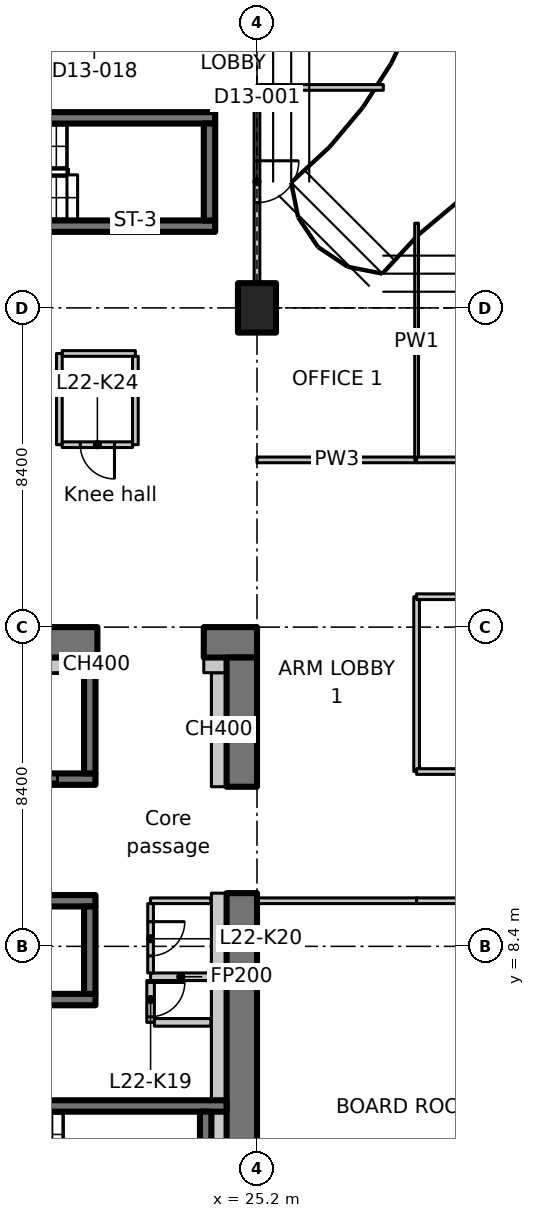
"""IFC4 building model, lengths in metres.
Left out: names, types, materials, properties, quantities, classifications, styles, units other than length and angle.
Written with IfcOpenShell. Run it as: python <this file> out.ifc"""

import sys

from ifc_helpers import new_model, si_unit, direction, frame, frame_2d, origin, origin_2d, place, context, subcontext, project, spatial, polyline, rectangle, outline, extrude, element, fill, save


model = new_model("IFC4")
c1 = context("Model", 3, precision=1e-05, world=origin(), true_north=direction((0.0, 1.0)))
c2 = subcontext(c1, "Body", "Model", "MODEL_VIEW")
j1 = project(units=[si_unit("LENGTHUNIT", "METRE"), si_unit("PLANEANGLEUNIT", "RADIAN")], contexts=[c1])
p1 = place(None, origin())
s1 = spatial("IfcSite", under=j1, at=p1, CompositionType="ELEMENT")
p2 = place(p1, origin())
s2 = spatial("IfcBuilding", under=s1, at=p2, CompositionType="ELEMENT")
p3 = place(p2, frame((0.0, 0.0, 95.3)))
s3 = spatial("IfcBuildingStorey", under=s2, at=p3, CompositionType="ELEMENT", Elevation=95.3)
p4 = place(p3, frame((25.2, 25.2, 0.0), z_axis=(0.0, 0.0, 1.0), x_axis=(1.0, 0.0, 0.0)))
e1 = element("IfcColumn", 1, at=p4, inside=s3, PredefinedType="COLUMN", context=c2, shape_type="SweptSolid", body=[
    extrude(rectangle(XDim=1.0, YDim=1.3, at=origin_2d()), origin(), (0.0, 0.0, 1.0), 3.35),
])
p5 = place(p3, frame((-1.1, 16.4, 0.0), z_axis=(0.0, 0.0, 1.0), x_axis=(1.0, 0.0, 0.0)))
e2 = element("IfcWall", 2, at=p5, inside=s3, PredefinedType="SHEAR", context=c2, shape_type="SweptSolid", body=[
    extrude(rectangle(XDim=22.1, YDim=0.8, at=frame_2d((11.05, 0.0))), origin(), (0.0, 0.0, 1.0), 3.35),
])
p6 = place(p5, frame((3.15, 0.0, 0.0)))
e3 = element("IfcOpeningElement", 3, at=p6, cuts=e2, PredefinedType="OPENING", context=c2, shape_type="SweptSolid", body=[
    extrude(rectangle(XDim=1.1, YDim=2.3, at=frame_2d((0.55, 1.15))), frame((0.0, 0.41, 0.0), z_axis=(0.0, -1.0, 0.0), x_axis=(1.0, 0.0, 0.0)), (0.0, 0.0, 1.0), 0.82),
])
p7 = place(p3, frame((23.8, 16.4, 0.0), z_axis=(0.0, 0.0, 1.0), x_axis=(1.0, 0.0, 0.0)))
e4 = element("IfcWall", 4, at=p7, inside=s3, PredefinedType="SHEAR", context=c2, shape_type="SweptSolid", body=[
    extrude(rectangle(XDim=1.4, YDim=0.8, at=frame_2d((0.7, 0.0))), origin(), (0.0, 0.0, 1.0), 3.35),
])
p8 = place(p3, frame((24.8, 0.8, 0.0), z_axis=(0.0, 0.0, 1.0), x_axis=(0.0, 1.0, 0.0)))
e5 = element("IfcWall", 5, at=p8, inside=s3, PredefinedType="SHEAR", context=c2, shape_type="SweptSolid", body=[
    extrude(rectangle(XDim=9.0, YDim=0.8, at=frame_2d((4.5, 0.0))), origin(), (0.0, 0.0, 1.0), 3.35),
])
p9 = place(p3, frame((24.8, 12.6, 0.0), z_axis=(0.0, 0.0, 1.0), x_axis=(0.0, 1.0, 0.0)))
e6 = element("IfcWall", 6, at=p9, inside=s3, PredefinedType="SHEAR", context=c2, shape_type="SweptSolid", body=[
    extrude(rectangle(XDim=3.4, YDim=0.8, at=frame_2d((1.7, 0.0))), origin(), (0.0, 0.0, 1.0), 3.35),
])
p10 = place(p3, frame((24.2, 12.6, 0.0), z_axis=(0.0, 0.0, 1.0), x_axis=(0.0, 1.0, 0.0)))
e7 = element("IfcWall", 7, at=p10, inside=s3, PredefinedType="PARTITIONING", context=c2, shape_type="SweptSolid", body=[
    extrude(rectangle(XDim=3.0, YDim=0.4, at=frame_2d((1.5, 0.0))), origin(), (0.0, 0.0, 1.0), 3.35),
])
p11 = place(p3, frame((23.8, 15.8, 0.0), z_axis=(0.0, 0.0, 1.0), x_axis=(1.0, 0.0, 0.0)))
e8 = element("IfcWall", 8, at=p11, inside=s3, PredefinedType="PARTITIONING", context=c2, shape_type="SweptSolid", body=[
    extrude(rectangle(XDim=0.6, YDim=0.4, at=frame_2d((0.3, 0.0))), origin(), (0.0, 0.0, 1.0), 3.35),
])
p12 = place(p3, frame((0.8, 7.0, 0.0), z_axis=(0.0, 0.0, 1.0), x_axis=(1.0, 0.0, 0.0)))
e9 = element("IfcWall", 9, at=p12, inside=s3, PredefinedType="SHEAR", context=c2, shape_type="SweptSolid", body=[
    extrude(rectangle(XDim=20.15, YDim=0.3, at=frame_2d((10.075, 0.0))), origin(), (0.0, 0.0, 1.0), 3.35),
])
p13 = place(p3, frame((0.8, 9.6, 0.0), z_axis=(0.0, 0.0, 1.0), x_axis=(1.0, 0.0, 0.0)))
e10 = element("IfcWall", 10, at=p13, inside=s3, PredefinedType="SHEAR", context=c2, shape_type="SweptSolid", body=[
    extrude(rectangle(XDim=20.15, YDim=0.3, at=frame_2d((10.075, 0.0))), origin(), (0.0, 0.0, 1.0), 3.35),
])
p14 = place(p13, frame((1.25, 0.0, 0.0)))
e11 = element("IfcOpeningElement", 11, at=p14, cuts=e10, PredefinedType="OPENING", context=c2, shape_type="SweptSolid", body=[
    extrude(rectangle(XDim=1.1, YDim=2.3, at=frame_2d((0.55, 1.15))), frame((0.0, 0.16, 0.0), z_axis=(0.0, -1.0, 0.0), x_axis=(1.0, 0.0, 0.0)), (0.0, 0.0, 1.0), 0.32),
])
p15 = place(p13, frame((4.05, 0.0, 0.0)))
e12 = element("IfcOpeningElement", 12, at=p15, cuts=e10, PredefinedType="OPENING", context=c2, shape_type="SweptSolid", body=[
    extrude(rectangle(XDim=1.1, YDim=2.3, at=frame_2d((0.55, 1.15))), frame((0.0, 0.16, 0.0), z_axis=(0.0, -1.0, 0.0), x_axis=(1.0, 0.0, 0.0)), (0.0, 0.0, 1.0), 0.32),
])
p16 = place(p13, frame((6.85, 0.0, 0.0)))
e13 = element("IfcOpeningElement", 13, at=p16, cuts=e10, PredefinedType="OPENING", context=c2, shape_type="SweptSolid", body=[
    extrude(rectangle(XDim=1.1, YDim=2.3, at=frame_2d((0.55, 1.15))), frame((0.0, 0.16, 0.0), z_axis=(0.0, -1.0, 0.0), x_axis=(1.0, 0.0, 0.0)), (0.0, 0.0, 1.0), 0.32),
])
p17 = place(p13, frame((9.65, 0.0, 0.0)))
e14 = element("IfcOpeningElement", 14, at=p17, cuts=e10, PredefinedType="OPENING", context=c2, shape_type="SweptSolid", body=[
    extrude(rectangle(XDim=1.1, YDim=2.3, at=frame_2d((0.55, 1.15))), frame((0.0, 0.16, 0.0), z_axis=(0.0, -1.0, 0.0), x_axis=(1.0, 0.0, 0.0)), (0.0, 0.0, 1.0), 0.32),
])
p18 = place(p13, frame((12.45, 0.0, 0.0)))
e15 = element("IfcOpeningElement", 15, at=p18, cuts=e10, PredefinedType="OPENING", context=c2, shape_type="SweptSolid", body=[
    extrude(rectangle(XDim=1.1, YDim=2.3, at=frame_2d((0.55, 1.15))), frame((0.0, 0.16, 0.0), z_axis=(0.0, -1.0, 0.0), x_axis=(1.0, 0.0, 0.0)), (0.0, 0.0, 1.0), 0.32),
])
p19 = place(p13, frame((15.25, 0.0, 0.0)))
e16 = element("IfcOpeningElement", 16, at=p19, cuts=e10, PredefinedType="OPENING", context=c2, shape_type="SweptSolid", body=[
    extrude(rectangle(XDim=1.1, YDim=2.3, at=frame_2d((0.55, 1.15))), frame((0.0, 0.16, 0.0), z_axis=(0.0, -1.0, 0.0), x_axis=(1.0, 0.0, 0.0)), (0.0, 0.0, 1.0), 0.32),
])
p20 = place(p3, frame((20.8, 7.15, 0.0), z_axis=(0.0, 0.0, 1.0), x_axis=(0.0, 1.0, 0.0)))
e17 = element("IfcWall", 17, at=p20, inside=s3, PredefinedType="SHEAR", context=c2, shape_type="SweptSolid", body=[
    extrude(rectangle(XDim=2.3, YDim=0.3, at=frame_2d((1.15, 0.0))), origin(), (0.0, 0.0, 1.0), 3.35),
])
p21 = place(p3, frame((15.05, 12.8, 0.0), z_axis=(0.0, 0.0, 1.0), x_axis=(1.0, 0.0, 0.0)))
e18 = element("IfcWall", 18, at=p21, inside=s3, PredefinedType="SHEAR", context=c2, shape_type="SweptSolid", body=[
    extrude(rectangle(XDim=5.9, YDim=0.3, at=frame_2d((2.95, 0.0))), origin(), (0.0, 0.0, 1.0), 3.35),
])
p22 = place(p21, frame((3.8, 0.0, 0.0)))
e19 = element("IfcOpeningElement", 19, at=p22, cuts=e18, PredefinedType="OPENING", context=c2, shape_type="SweptSolid", body=[
    extrude(rectangle(XDim=1.1, YDim=2.3, at=frame_2d((0.55, 1.15))), frame((0.0, 0.16, 0.0), z_axis=(0.0, -1.0, 0.0), x_axis=(1.0, 0.0, 0.0)), (0.0, 0.0, 1.0), 0.32),
])
p23 = place(p3, frame((20.8, 12.95, 0.0), z_axis=(0.0, 0.0, 1.0), x_axis=(0.0, 1.0, 0.0)))
e20 = element("IfcWall", 20, at=p23, inside=s3, PredefinedType="SHEAR", context=c2, shape_type="SweptSolid", body=[
    extrude(rectangle(XDim=3.05, YDim=0.3, at=frame_2d((1.525, 0.0))), origin(), (0.0, 0.0, 1.0), 3.35),
])
p24 = place(p3, frame((15.8, 4.2, 0.0), z_axis=(0.0, 0.0, 1.0), x_axis=(1.0, 0.0, 0.0)))
e21 = element("IfcWall", 21, at=p24, inside=s3, PredefinedType="SHEAR", context=c2, shape_type="SweptSolid", body=[
    extrude(rectangle(XDim=8.6, YDim=0.3, at=frame_2d((4.3, 0.0))), origin(), (0.0, 0.0, 1.0), 3.35),
])
p25 = place(p24, frame((0.4, 0.0, 0.0)))
e22 = element("IfcOpeningElement", 22, at=p25, cuts=e21, PredefinedType="OPENING", context=c2, shape_type="SweptSolid", body=[
    extrude(rectangle(XDim=1.0, YDim=2.1, at=frame_2d((0.5, 1.05))), frame((0.0, 0.16, 0.0), z_axis=(0.0, -1.0, 0.0), x_axis=(1.0, 0.0, 0.0)), (0.0, 0.0, 1.0), 0.32),
])
p26 = place(p3, frame((23.85, 1.5, 0.0), z_axis=(0.0, 0.0, 1.0), x_axis=(0.0, 1.0, 0.0)))
e23 = element("IfcWall", 23, at=p26, inside=s3, PredefinedType="SHEAR", context=c2, shape_type="SweptSolid", body=[
    extrude(rectangle(XDim=2.55, YDim=0.3, at=frame_2d((1.275, 0.0))), origin(), (0.0, 0.0, 1.0), 3.35),
])
for number, where, z_axis, x_axis in (
    (24, (15.9, 27.35, 0.0), (0.0, 0.0, 1.0), (1.0, 0.0, 0.0)),
    (25, (15.9, 30.2, 0.0), (0.0, 0.0, 1.0), (1.0, 0.0, 0.0)),
):
    element("IfcWall", number, at=place(p3, frame(where, z_axis=z_axis, x_axis=x_axis)), inside=s3, PredefinedType="SHEAR", context=c2, shape_type="SweptSolid", body=[
        extrude(rectangle(XDim=8.2, YDim=0.3, at=frame_2d((4.1, 0.0))), origin(), (0.0, 0.0, 1.0), 3.35),
    ])
p27 = place(p3, frame((23.95, 27.5, 0.0), z_axis=(0.0, 0.0, 1.0), x_axis=(0.0, 1.0, 0.0)))
e26 = element("IfcWall", 26, at=p27, inside=s3, PredefinedType="SHEAR", context=c2, shape_type="SweptSolid", body=[
    extrude(rectangle(XDim=2.55, YDim=0.3, at=frame_2d((1.275, 0.0))), origin(), (0.0, 0.0, 1.0), 3.35),
])
p28 = place(p3, frame((23.988, 7.6, 0.0), z_axis=(0.0, 0.0, 1.0), x_axis=(-1.0, 0.0, 0.0)))
e27 = element("IfcWall", 27, at=p28, inside=s3, PredefinedType="PARTITIONING", context=c2, shape_type="SweptSolid", body=[
    extrude(rectangle(XDim=1.588, YDim=0.2, at=frame_2d((0.794, 0.0))), origin(), (0.0, 0.0, 1.0), 3.35),
])
p29 = place(p3, frame((22.4, 7.5, 0.0), z_axis=(0.0, 0.0, 1.0), x_axis=(0.0, -1.0, 0.0)))
e28 = element("IfcWall", 28, at=p29, inside=s3, PredefinedType="PARTITIONING", context=c2, shape_type="SweptSolid", body=[
    extrude(rectangle(XDim=1.1, YDim=0.2, at=frame_2d((0.55, 0.0))), origin(), (0.0, 0.0, 1.0), 3.35),
])
p30 = place(p29, frame((0.05, 0.0, 0.0)))
e29 = element("IfcOpeningElement", 29, at=p30, cuts=e28, PredefinedType="OPENING", context=c2, shape_type="SweptSolid", body=[
    extrude(rectangle(XDim=0.9, YDim=2.1, at=frame_2d((0.45, 1.05))), frame((0.0, 0.11, 0.0), z_axis=(0.0, -1.0, 0.0), x_axis=(1.0, 0.0, 0.0)), (0.0, 0.0, 1.0), 0.22),
])
p31 = place(p3, frame((22.5, 6.4, 0.0), z_axis=(0.0, 0.0, 1.0), x_axis=(1.0, 0.0, 0.0)))
e30 = element("IfcWall", 30, at=p31, inside=s3, PredefinedType="PARTITIONING", context=c2, shape_type="SweptSolid", body=[
    extrude(rectangle(XDim=1.488, YDim=0.2, at=frame_2d((0.744, 0.0))), origin(), (0.0, 0.0, 1.0), 3.35),
])
p32 = place(p3, frame((23.988, 9.6, 0.0), z_axis=(0.0, 0.0, 1.0), x_axis=(-1.0, 0.0, 0.0)))
e31 = element("IfcWall", 31, at=p32, inside=s3, PredefinedType="PARTITIONING", context=c2, shape_type="SweptSolid", body=[
    extrude(rectangle(XDim=1.588, YDim=0.15, at=frame_2d((0.794, 0.0))), origin(), (0.0, 0.0, 1.0), 3.35),
])
p33 = place(p3, frame((22.4, 9.525, 0.0), z_axis=(0.0, 0.0, 1.0), x_axis=(0.0, -1.0, 0.0)))
e32 = element("IfcWall", 32, at=p33, inside=s3, PredefinedType="PARTITIONING", context=c2, shape_type="SweptSolid", body=[
    extrude(rectangle(XDim=1.825, YDim=0.15, at=frame_2d((0.913, 0.0))), origin(), (0.0, 0.0, 1.0), 3.35),
])
p34 = place(p33, frame((0.475, 0.0, 0.0)))
e33 = element("IfcOpeningElement", 33, at=p34, cuts=e32, PredefinedType="OPENING", context=c2, shape_type="SweptSolid", body=[
    extrude(rectangle(XDim=0.9, YDim=2.1, at=frame_2d((0.45, 1.05))), frame((0.0, 0.085, 0.0), z_axis=(0.0, -1.0, 0.0), x_axis=(1.0, 0.0, 0.0)), (0.0, 0.0, 1.0), 0.17),
])
p35 = place(p3, frame((20.0, 21.6, 0.0), z_axis=(0.0, 0.0, 1.0), x_axis=(0.0, 1.0, 0.0)))
e34 = element("IfcWall", 34, at=p35, inside=s3, PredefinedType="PARTITIONING", context=c2, shape_type="SweptSolid", body=[
    extrude(rectangle(XDim=2.4, YDim=0.15, at=frame_2d((1.2, 0.0))), origin(), (0.0, 0.0, 1.0), 3.35),
])
p36 = place(p3, frame((20.075, 24.0, 0.0), z_axis=(0.0, 0.0, 1.0), x_axis=(1.0, 0.0, 0.0)))
e35 = element("IfcWall", 35, at=p36, inside=s3, PredefinedType="PARTITIONING", context=c2, shape_type="SweptSolid", body=[
    extrude(rectangle(XDim=1.925, YDim=0.15, at=frame_2d((0.962, 0.0))), origin(), (0.0, 0.0, 1.0), 3.35),
])
p37 = place(p3, frame((22.0, 23.925, 0.0), z_axis=(0.0, 0.0, 1.0), x_axis=(0.0, -1.0, 0.0)))
e36 = element("IfcWall", 36, at=p37, inside=s3, PredefinedType="PARTITIONING", context=c2, shape_type="SweptSolid", body=[
    extrude(rectangle(XDim=2.325, YDim=0.15, at=frame_2d((1.163, 0.0))), origin(), (0.0, 0.0, 1.0), 3.35),
])
p38 = place(p3, frame((21.925, 21.6, 0.0), z_axis=(0.0, 0.0, 1.0), x_axis=(-1.0, 0.0, 0.0)))
e37 = element("IfcWall", 37, at=p38, inside=s3, PredefinedType="PARTITIONING", context=c2, shape_type="SweptSolid", body=[
    extrude(rectangle(XDim=1.85, YDim=0.15, at=frame_2d((0.925, 0.0))), origin(), (0.0, 0.0, 1.0), 3.35),
])
p39 = place(p38, frame((0.475, 0.0, 0.0)))
e38 = element("IfcOpeningElement", 38, at=p39, cuts=e37, PredefinedType="OPENING", context=c2, shape_type="SweptSolid", body=[
    extrude(rectangle(XDim=0.9, YDim=2.1, at=frame_2d((0.45, 1.05))), frame((0.0, 0.085, 0.0), z_axis=(0.0, -1.0, 0.0), x_axis=(1.0, 0.0, 0.0)), (0.0, 0.0, 1.0), 0.17),
])
p40 = place(p3, frame((18.15, 15.8, 0.0), z_axis=(0.0, 0.0, 1.0), x_axis=(1.0, 0.0, 0.0)))
e39 = element("IfcWall", 39, at=p40, inside=s3, PredefinedType="PARTITIONING", context=c2, shape_type="SweptSolid", body=[
    extrude(rectangle(XDim=2.5, YDim=0.4, at=frame_2d((1.25, 0.0))), origin(), (0.0, 0.0, 1.0), 3.35),
])
p41 = place(p3, frame((20.95, 15.8, 0.0), z_axis=(0.0, 0.0, 1.0), x_axis=(1.0, 0.0, 0.0)))
e40 = element("IfcWall", 40, at=p41, inside=s3, PredefinedType="PARTITIONING", context=c2, shape_type="SweptSolid", body=[
    extrude(rectangle(XDim=0.05, YDim=0.4, at=frame_2d((0.025, 0.0))), origin(), (0.0, 0.0, 1.0), 3.35),
])
p42 = place(p3, frame((24.2, 1.5, 0.0), z_axis=(0.0, 0.0, 1.0), x_axis=(0.0, 1.0, 0.0)))
e41 = element("IfcWall", 41, at=p42, inside=s3, PredefinedType="PARTITIONING", context=c2, shape_type="SweptSolid", body=[
    extrude(rectangle(XDim=2.55, YDim=0.4, at=frame_2d((1.275, 0.0))), origin(), (0.0, 0.0, 1.0), 3.35),
])
p43 = place(p3, frame((24.2, 4.35, 0.0), z_axis=(0.0, 0.0, 1.0), x_axis=(0.0, 1.0, 0.0)))
e42 = element("IfcWall", 42, at=p43, inside=s3, PredefinedType="PARTITIONING", context=c2, shape_type="SweptSolid", body=[
    extrude(rectangle(XDim=5.45, YDim=0.4, at=frame_2d((2.725, 0.0))), origin(), (0.0, 0.0, 1.0), 3.35),
])
p44 = place(p3, frame((25.2, 21.2, 0.0), z_axis=(0.0, 0.0, 1.0), x_axis=(1.0, 0.0, 0.0)))
e43 = element("IfcWall", 43, at=p44, inside=s3, PredefinedType="PARTITIONING", context=c2, shape_type="SweptSolid", body=[
    extrude(rectangle(XDim=4.2, YDim=0.15, at=frame_2d((2.1, 0.0))), origin(), (0.0, 0.0, 1.0), 3.33),
])
p45 = place(p3, frame((29.4, 17.6, 0.0), z_axis=(0.0, 0.0, 1.0), x_axis=(0.0, -1.0, 0.0)))
e44 = element("IfcWall", 44, at=p45, inside=s3, PredefinedType="PARTITIONING", context=c2, shape_type="SweptSolid", body=[
    extrude(rectangle(XDim=4.6, YDim=0.15, at=frame_2d((2.3, 0.0))), origin(), (0.0, 0.0, 1.0), 3.33),
])
p46 = place(p3, frame((29.4, 9.6, 0.0), z_axis=(0.0, 0.0, 1.0), x_axis=(-1.0, 0.0, 0.0)))
e45 = element("IfcWall", 45, at=p46, inside=s3, PredefinedType="PARTITIONING", context=c2, shape_type="SweptSolid", body=[
    extrude(rectangle(XDim=4.2, YDim=0.15, at=frame_2d((2.1, 0.0))), origin(), (0.0, 0.0, 1.0), 3.33),
])
p47 = place(p3, frame((29.4, 27.429, 0.0), z_axis=(0.0, 0.0, 1.0), x_axis=(0.0, -1.0, 0.0)))
e46 = element("IfcWall", 46, at=p47, inside=s3, PredefinedType="PARTITIONING", context=c2, shape_type="SweptSolid", body=[
    extrude(outline(polyline([(0.0, 0.0), (6.229, 0.0), (6.229, 3.33), (2.679, 3.33), (2.677, 2.98), (1.781, 2.98), (1.779, 3.33), (0.154, 3.33), (0.0, 3.33), (0.0, 0.0)])), frame((0.0, 0.05, 0.0), z_axis=(0.0, -1.0, 0.0), x_axis=(1.0, 0.0, 0.0)), (0.0, 0.0, 1.0), 0.1),
])
p48 = place(p3, frame((25.2, 31.0, 0.0), z_axis=(0.0, 0.0, 1.0), x_axis=(0.0, -1.0, 0.0)))
e47 = element("IfcWall", 47, at=p48, inside=s3, PredefinedType="PARTITIONING", context=c2, shape_type="SweptSolid", body=[
    extrude(outline(polyline([(0.0, 0.0), (5.13, 0.0), (5.13, 2.98), (0.0, 2.98), (0.0, 0.0)])), frame((0.0, 0.075, 0.0), z_axis=(0.0, -1.0, 0.0), x_axis=(1.0, 0.0, 0.0)), (0.0, 0.0, 1.0), 0.15),
])
p49 = place(p48, frame((1.93, 0.0, 0.0)))
e48 = element("IfcOpeningElement", 48, at=p49, cuts=e47, PredefinedType="OPENING", context=c2, shape_type="SweptSolid", body=[
    extrude(rectangle(XDim=1.1, YDim=2.1, at=frame_2d((0.55, 1.05))), frame((0.0, 0.085, 0.0), z_axis=(0.0, -1.0, 0.0), x_axis=(1.0, 0.0, 0.0)), (0.0, 0.0, 1.0), 0.17),
])
p50 = place(p3, frame((25.2, 31.0, 0.0), z_axis=(0.0, 0.0, 1.0), x_axis=(1.0, 0.0, 0.0)))
e49 = element("IfcWall", 49, at=p50, inside=s3, PredefinedType="PARTITIONING", context=c2, shape_type="SweptSolid", body=[
    extrude(rectangle(XDim=3.324, YDim=0.15, at=frame_2d((1.662, 0.0))), origin(), (0.0, 0.0, 1.0), 2.98),
])
p51 = place(p3, frame((29.4, 13.0, 0.0), z_axis=(0.0, 0.0, 1.0), x_axis=(1.0, 0.0, 0.0)))
e50 = element("IfcWall", 50, at=p51, inside=s3, PredefinedType="PARTITIONING", context=c2, shape_type="SweptSolid", body=[
    extrude(rectangle(XDim=5.4, YDim=0.15, at=frame_2d((2.7, 0.0))), origin(), (0.0, 0.0, 1.0), 3.33),
])
p52 = place(p51, frame((2.1, 0.0, 0.0)))
e51 = element("IfcOpeningElement", 51, at=p52, cuts=e50, PredefinedType="OPENING", context=c2, shape_type="SweptSolid", body=[
    extrude(rectangle(XDim=1.0, YDim=2.1, at=frame_2d((0.5, 1.05))), frame((0.0, 0.085, 0.0), z_axis=(0.0, -1.0, 0.0), x_axis=(1.0, 0.0, 0.0)), (0.0, 0.0, 1.0), 0.17),
])
p53 = place(p3, frame((33.6, 9.6, 0.0), z_axis=(0.0, 0.0, 1.0), x_axis=(-1.0, 0.0, 0.0)))
e52 = element("IfcWall", 52, at=p53, inside=s3, PredefinedType="PARTITIONING", context=c2, shape_type="SweptSolid", body=[
    extrude(rectangle(XDim=4.2, YDim=0.15, at=frame_2d((2.1, 0.0))), origin(), (0.0, 0.0, 1.0), 3.33),
])
p54 = place(p53, frame((1.2, 0.0, 0.0)))
e53 = element("IfcOpeningElement", 53, at=p54, cuts=e52, PredefinedType="OPENING", context=c2, shape_type="SweptSolid", body=[
    extrude(rectangle(XDim=1.6, YDim=2.1, at=frame_2d((0.8, 1.05))), frame((0.0, 0.085, 0.0), z_axis=(0.0, -1.0, 0.0), x_axis=(1.0, 0.0, 0.0)), (0.0, 0.0, 1.0), 0.17),
])
p55 = place(p3, frame((34.8, 17.6, 0.0), z_axis=(0.0, 0.0, 1.0), x_axis=(-1.0, 0.0, 0.0)))
e54 = element("IfcWall", 54, at=p55, inside=s3, PredefinedType="PARTITIONING", context=c2, shape_type="SweptSolid", body=[
    extrude(rectangle(XDim=5.4, YDim=0.15, at=frame_2d((2.7, 0.0))), origin(), (0.0, 0.0, 1.0), 3.33),
])
p56 = place(p3, frame((29.4, 21.2, 0.0), z_axis=(0.0, 0.0, 1.0), x_axis=(1.0, 0.0, 0.0)))
e55 = element("IfcWall", 55, at=p56, inside=s3, PredefinedType="PARTITIONING", context=c2, shape_type="SweptSolid", body=[
    extrude(rectangle(XDim=8.4, YDim=0.15, at=frame_2d((4.2, 0.0))), origin(), (0.0, 0.0, 1.0), 3.33),
])
p57 = place(p56, frame((3.3, 0.0, 0.0)))
e56 = element("IfcOpeningElement", 56, at=p57, cuts=e55, PredefinedType="OPENING", context=c2, shape_type="SweptSolid", body=[
    extrude(rectangle(XDim=1.6, YDim=2.1, at=frame_2d((0.8, 1.05))), frame((0.0, 0.085, 0.0), z_axis=(0.0, -1.0, 0.0), x_axis=(1.0, 0.0, 0.0)), (0.0, 0.0, 1.0), 0.17),
])
p58 = place(p22, origin())
e57 = element("IfcDoor", 57, at=p58, inside=s3, OperationType="SLIDING_TO_LEFT", PredefinedType="DOOR", context=c2, shape_type="SweptSolid", body=[
    extrude(rectangle(XDim=1.1, YDim=2.3, at=frame_2d((0.55, 1.15))), frame((0.0, 0.025, 0.0), z_axis=(0.0, -1.0, 0.0), x_axis=(1.0, 0.0, 0.0)), (0.0, 0.0, 1.0), 0.05),
])
fill(e19, e57)
p59 = place(p30, origin())
e58 = element("IfcDoor", 58, at=p59, inside=s3, OperationType="SINGLE_SWING_RIGHT", PredefinedType="DOOR", context=c2, shape_type="SweptSolid", body=[
    extrude(rectangle(XDim=0.9, YDim=2.1, at=frame_2d((0.45, 1.05))), frame((0.0, 0.025, 0.0), z_axis=(0.0, -1.0, 0.0), x_axis=(1.0, 0.0, 0.0)), (0.0, 0.0, 1.0), 0.05),
])
fill(e29, e58)
p60 = place(p34, origin())
e59 = element("IfcDoor", 59, at=p60, inside=s3, OperationType="SINGLE_SWING_LEFT", PredefinedType="DOOR", context=c2, shape_type="SweptSolid", body=[
    extrude(rectangle(XDim=0.9, YDim=2.1, at=frame_2d((0.45, 1.05))), frame((0.0, 0.025, 0.0), z_axis=(0.0, -1.0, 0.0), x_axis=(1.0, 0.0, 0.0)), (0.0, 0.0, 1.0), 0.05),
])
fill(e33, e59)
p61 = place(p39, origin())
e60 = element("IfcDoor", 60, at=p61, inside=s3, OperationType="SINGLE_SWING_LEFT", PredefinedType="DOOR", context=c2, shape_type="SweptSolid", body=[
    extrude(rectangle(XDim=0.9, YDim=2.1, at=frame_2d((0.45, 1.05))), frame((0.0, 0.025, 0.0), z_axis=(0.0, -1.0, 0.0), x_axis=(1.0, 0.0, 0.0)), (0.0, 0.0, 1.0), 0.05),
])
fill(e38, e60)
p62 = place(p49, origin())
e61 = element("IfcDoor", 61, at=p62, inside=s3, OperationType="SINGLE_SWING_RIGHT", PredefinedType="DOOR", context=c2, shape_type="SweptSolid", body=[
    extrude(rectangle(XDim=1.1, YDim=2.1, at=frame_2d((0.55, 1.05))), frame((0.0, 0.025, 0.0), z_axis=(0.0, -1.0, 0.0), x_axis=(1.0, 0.0, 0.0)), (0.0, 0.0, 1.0), 0.05),
])
fill(e48, e61)
save(model, sys.argv[1])
